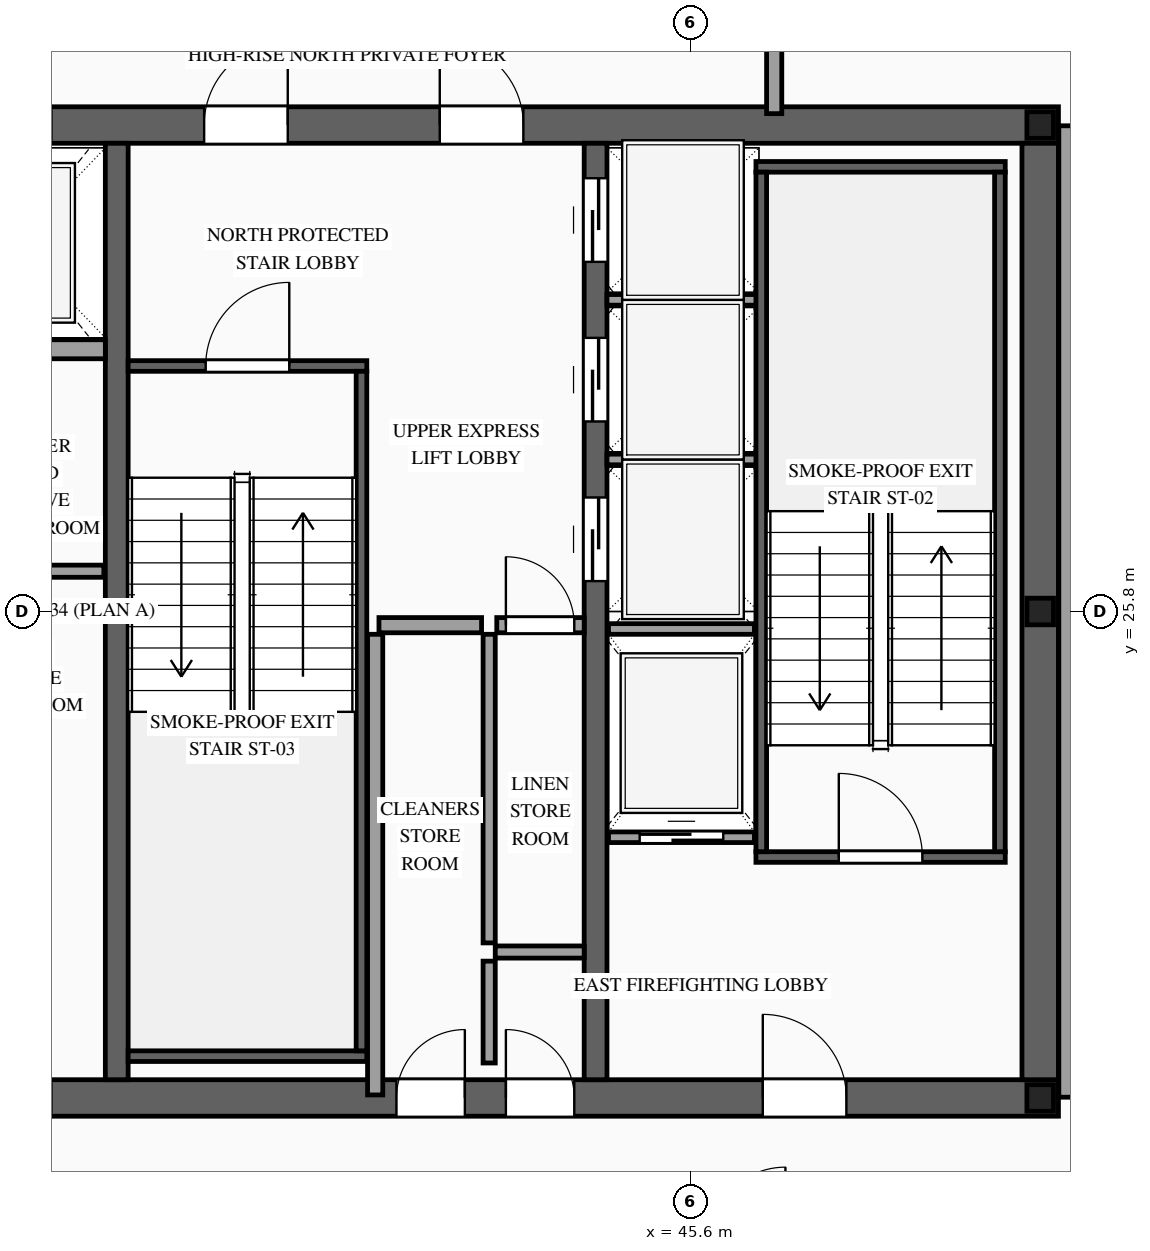
"""IFC4 building model, lengths in metres.
Left out: names, types, materials, properties, quantities, classifications, styles, units other than length and angle.
Written with IfcOpenShell. Run it as: python <this file> out.ifc"""

import sys

from ifc_helpers import new_model, si_unit, direction, frame, frame_2d, origin, origin_2d, place, context, subcontext, project, spatial, rectangle, i_section, extrude, source, transform, mapped, element, fill, save


model = new_model("IFC4")
c1 = context("Model", 3, precision=1e-05, world=origin(), true_north=direction((0.0, 1.0)))
c2 = subcontext(c1, "Body", "Model", "MODEL_VIEW")
j1 = project(units=[si_unit("LENGTHUNIT", "METRE"), si_unit("PLANEANGLEUNIT", "RADIAN")], contexts=[c1])
p1 = place(None, origin())
s1 = spatial("IfcSite", under=j1, at=p1, CompositionType="ELEMENT")
p2 = place(p1, origin())
s2 = spatial("IfcBuilding", under=s1, at=p2, CompositionType="ELEMENT")
p3 = place(p2, frame((0.0, 0.0, 343.2)))
s3 = spatial("IfcBuildingStorey", under=s2, at=p3, CompositionType="ELEMENT", Elevation=343.2)
p4 = place(p3, frame((23.56, 19.4, 0.0), z_axis=(0.0, 0.0, 1.0), x_axis=(1.0, 0.0, 0.0)))
e1 = element("IfcWall", 1, at=p4, inside=s3, PredefinedType="SHEAR", context=c2, shape_type="SweptSolid", body=[
    extrude(rectangle(XDim=26.88, YDim=0.48, at=frame_2d((13.44, 0.0))), origin(), (0.0, 0.0, 1.0), 4.0),
])
p5 = place(p4, frame((1.89, 0.0, 0.0)))
e2 = element("IfcOpeningElement", 2, at=p5, cuts=e1, PredefinedType="OPENING", context=c2, shape_type="SweptSolid", body=[
    extrude(rectangle(XDim=1.1, YDim=2.2, at=frame_2d((0.55, 1.1))), frame((0.0, 0.255, 0.0), z_axis=(0.0, -1.0, 0.0), x_axis=(1.0, 0.0, 0.0)), (0.0, 0.0, 1.0), 0.51),
])
p6 = place(p4, frame((9.79, 0.0, 0.0)))
e3 = element("IfcOpeningElement", 3, at=p6, cuts=e1, PredefinedType="OPENING", context=c2, shape_type="SweptSolid", body=[
    extrude(rectangle(XDim=1.1, YDim=2.2, at=frame_2d((0.55, 1.1))), frame((0.0, 0.255, 0.0), z_axis=(0.0, -1.0, 0.0), x_axis=(1.0, 0.0, 0.0)), (0.0, 0.0, 1.0), 0.51),
])
p7 = place(p4, frame((22.99, 0.0, 0.0)))
e4 = element("IfcOpeningElement", 4, at=p7, cuts=e1, PredefinedType="OPENING", context=c2, shape_type="SweptSolid", body=[
    extrude(rectangle(XDim=1.1, YDim=2.2, at=frame_2d((0.55, 1.1))), frame((0.0, 0.255, 0.0), z_axis=(0.0, -1.0, 0.0), x_axis=(1.0, 0.0, 0.0)), (0.0, 0.0, 1.0), 0.51),
])
p8 = place(p4, frame((19.61, 0.0, 0.0)))
e5 = element("IfcOpeningElement", 5, at=p8, cuts=e1, PredefinedType="OPENING", context=c2, shape_type="SweptSolid", body=[
    extrude(rectangle(XDim=0.9, YDim=2.15, at=frame_2d((0.45, 1.075))), frame((0.0, 0.255, 0.0), z_axis=(0.0, -1.0, 0.0), x_axis=(1.0, 0.0, 0.0)), (0.0, 0.0, 1.0), 0.51),
])
p9 = place(p4, frame((18.17, 0.0, 0.0)))
e6 = element("IfcOpeningElement", 6, at=p9, cuts=e1, PredefinedType="OPENING", context=c2, shape_type="SweptSolid", body=[
    extrude(rectangle(XDim=0.9, YDim=2.15, at=frame_2d((0.45, 1.075))), frame((0.0, 0.255, 0.0), z_axis=(0.0, -1.0, 0.0), x_axis=(1.0, 0.0, 0.0)), (0.0, 0.0, 1.0), 0.51),
])
p10 = place(p3, frame((23.56, 32.2, 0.0), z_axis=(0.0, 0.0, 1.0), x_axis=(1.0, 0.0, 0.0)))
e7 = element("IfcWall", 7, at=p10, inside=s3, PredefinedType="SHEAR", context=c2, shape_type="SweptSolid", body=[
    extrude(rectangle(XDim=26.88, YDim=0.48, at=frame_2d((13.44, 0.0))), origin(), (0.0, 0.0, 1.0), 4.0),
])
p11 = place(p10, frame((4.51, 0.0, 0.0)))
e8 = element("IfcOpeningElement", 8, at=p11, cuts=e7, PredefinedType="OPENING", context=c2, shape_type="SweptSolid", body=[
    extrude(rectangle(XDim=0.9, YDim=2.15, at=frame_2d((0.45, 1.075))), frame((0.0, 0.255, 0.0), z_axis=(0.0, -1.0, 0.0), x_axis=(1.0, 0.0, 0.0)), (0.0, 0.0, 1.0), 0.51),
])
p12 = place(p10, frame((9.79, 0.0, 0.0)))
e9 = element("IfcOpeningElement", 9, at=p12, cuts=e7, PredefinedType="OPENING", context=c2, shape_type="SweptSolid", body=[
    extrude(rectangle(XDim=1.1, YDim=2.2, at=frame_2d((0.55, 1.1))), frame((0.0, 0.255, 0.0), z_axis=(0.0, -1.0, 0.0), x_axis=(1.0, 0.0, 0.0)), (0.0, 0.0, 1.0), 0.51),
])
p13 = place(p10, frame((15.64, 0.0, 0.0)))
e10 = element("IfcOpeningElement", 10, at=p13, cuts=e7, PredefinedType="OPENING", context=c2, shape_type="SweptSolid", body=[
    extrude(rectangle(XDim=1.1, YDim=2.2, at=frame_2d((0.55, 1.1))), frame((0.0, 0.255, 0.0), z_axis=(0.0, -1.0, 0.0), x_axis=(1.0, 0.0, 0.0)), (0.0, 0.0, 1.0), 0.51),
])
p14 = place(p10, frame((18.74, 0.0, 0.0)))
e11 = element("IfcOpeningElement", 11, at=p14, cuts=e7, PredefinedType="OPENING", context=c2, shape_type="SweptSolid", body=[
    extrude(rectangle(XDim=1.1, YDim=2.2, at=frame_2d((0.55, 1.1))), frame((0.0, 0.255, 0.0), z_axis=(0.0, -1.0, 0.0), x_axis=(1.0, 0.0, 0.0)), (0.0, 0.0, 1.0), 0.51),
])
m1 = source(origin(), c2, "Body", "SweptSolid", [
    extrude(rectangle(XDim=12.32, YDim=0.48, at=frame_2d((6.16, 0.0))), origin(), (0.0, 0.0, 1.0), 4.0),
])
p15 = place(p3, frame((50.2, 19.64, 0.0), z_axis=(0.0, 0.0, 1.0), x_axis=(0.0, 1.0, 0.0)))
e12 = element("IfcWall", 12, at=p15, inside=s3, PredefinedType="SHEAR", context=c2, shape_type="MappedRepresentation", body=[
    mapped(m1, transform((0.0, 0.0, 0.0), scale=1.0)),
])
m2 = source(origin(), c2, "Body", "SweptSolid", [
    extrude(rectangle(XDim=12.32, YDim=0.3, at=frame_2d((6.16, 0.0))), origin(), (0.0, 0.0, 1.0), 4.0),
])
p16 = place(p3, frame((38.05, 19.64, 0.0), z_axis=(0.0, 0.0, 1.0), x_axis=(0.0, 1.0, 0.0)))
e13 = element("IfcWall", 13, at=p16, inside=s3, PredefinedType="SOLIDWALL", context=c2, shape_type="MappedRepresentation", body=[
    mapped(m2, transform((0.0, 0.0, 0.0), scale=1.0)),
])
p17 = place(p3, frame((44.35, 19.64, 0.0), z_axis=(0.0, 0.0, 1.0), x_axis=(0.0, 1.0, 0.0)))
e14 = element("IfcWall", 14, at=p17, inside=s3, PredefinedType="SOLIDWALL", context=c2, shape_type="SweptSolid", body=[
    extrude(rectangle(XDim=12.32, YDim=0.3, at=frame_2d((6.16, 0.0))), origin(), (0.0, 0.0, 1.0), 4.0),
])
p18 = place(p17, frame((6.56, 0.0, 0.0)))
e15 = element("IfcOpeningElement", 15, at=p18, cuts=e14, PredefinedType="OPENING", context=c2, shape_type="SweptSolid", body=[
    extrude(rectangle(XDim=1.1, YDim=2.2, at=frame_2d((0.55, 1.1))), frame((0.0, 0.165, 0.0), z_axis=(0.0, -1.0, 0.0), x_axis=(1.0, 0.0, 0.0)), (0.0, 0.0, 1.0), 0.33),
])
p19 = place(p17, frame((8.66, 0.0, 0.0)))
e16 = element("IfcOpeningElement", 16, at=p19, cuts=e14, PredefinedType="OPENING", context=c2, shape_type="SweptSolid", body=[
    extrude(rectangle(XDim=1.1, YDim=2.2, at=frame_2d((0.55, 1.1))), frame((0.0, 0.165, 0.0), z_axis=(0.0, -1.0, 0.0), x_axis=(1.0, 0.0, 0.0)), (0.0, 0.0, 1.0), 0.33),
])
p20 = place(p17, frame((10.76, 0.0, 0.0)))
e17 = element("IfcOpeningElement", 17, at=p20, cuts=e14, PredefinedType="OPENING", context=c2, shape_type="SweptSolid", body=[
    extrude(rectangle(XDim=1.1, YDim=2.2, at=frame_2d((0.55, 1.1))), frame((0.0, 0.165, 0.0), z_axis=(0.0, -1.0, 0.0), x_axis=(1.0, 0.0, 0.0)), (0.0, 0.0, 1.0), 0.33),
])
m3 = source(origin(), c2, "Body", "SweptSolid", [
    extrude(i_section(OverallWidth=0.35, OverallDepth=0.35, WebThickness=0.012, FlangeThickness=0.019, at=origin_2d()), origin(), (0.0, 0.0, 1.0), 4.0),
])
for number, where, z_axis, x_axis in (
    (18, (50.2, 19.4, 0.0), (0.0, 0.0, 1.0), (1.0, 0.0, 0.0)),
    (19, (50.2, 25.8, 0.0), (0.0, 0.0, 1.0), (1.0, 0.0, 0.0)),
    (20, (50.2, 32.2, 0.0), (0.0, 0.0, 1.0), (1.0, 0.0, 0.0)),
):
    element("IfcColumn", number, at=place(p3, frame(where, z_axis=z_axis, x_axis=x_axis)), inside=s3, PredefinedType="COLUMN", context=c2, shape_type="MappedRepresentation", body=[
        mapped(m3, transform((0.0, 0.0, 0.0), scale=1.0)),
    ])
p21 = place(p3, frame((44.52, 22.83, 0.0), z_axis=(0.0, 0.0, 1.0), x_axis=(1.0, 0.0, 0.0)))
e21 = element("IfcWall", 21, at=p21, inside=s3, PredefinedType="SOLIDWALL", context=c2, shape_type="SweptSolid", body=[
    extrude(rectangle(XDim=1.92, YDim=0.14, at=frame_2d((0.96, 0.0))), origin(), (0.0, 0.0, 1.0), 3.76),
])
p22 = place(p21, frame((0.41, 0.0, 0.0)))
e22 = element("IfcOpeningElement", 22, at=p22, cuts=e21, PredefinedType="OPENING", context=c2, shape_type="SweptSolid", body=[
    extrude(rectangle(XDim=1.1, YDim=2.2, at=frame_2d((0.55, 1.1))), frame((0.0, 0.085, 0.0), z_axis=(0.0, -1.0, 0.0), x_axis=(1.0, 0.0, 0.0)), (0.0, 0.0, 1.0), 0.17),
])
m4 = source(origin(), c2, "Body", "SweptSolid", [
    extrude(rectangle(XDim=1.92, YDim=0.14, at=frame_2d((0.96, 0.0))), origin(), (0.0, 0.0, 1.0), 3.76),
])
p23 = place(p3, frame((44.52, 25.57, 0.0), z_axis=(0.0, 0.0, 1.0), x_axis=(1.0, 0.0, 0.0)))
e23 = element("IfcWall", 23, at=p23, inside=s3, PredefinedType="SOLIDWALL", context=c2, shape_type="MappedRepresentation", body=[
    mapped(m4, transform((0.0, 0.0, 0.0), scale=1.0)),
])
m5 = source(origin(), c2, "Body", "SweptSolid", [
    extrude(rectangle(XDim=2.4, YDim=0.25, at=frame_2d((1.2, 0.0))), origin(), (0.0, 0.0, 1.0), 3.76),
])
p24 = place(p3, frame((35.5, 29.25, 0.0), z_axis=(0.0, 0.0, 1.0), x_axis=(1.0, 0.0, 0.0)))
e24 = element("IfcWall", 24, at=p24, inside=s3, PredefinedType="SOLIDWALL", context=c2, shape_type="MappedRepresentation", body=[
    mapped(m5, transform((0.0, 0.0, 0.0), scale=1.0)),
])
m6 = source(origin(), c2, "Body", "SweptSolid", [
    extrude(rectangle(XDim=2.0, YDim=0.14, at=frame_2d((1.0, 0.0))), origin(), (0.0, 0.0, 1.0), 3.76),
])
for number, where, z_axis, x_axis in (
    (25, (44.5, 27.8, 0.0), (0.0, 0.0, 1.0), (1.0, 0.0, 0.0)),
    (26, (44.5, 29.9, 0.0), (0.0, 0.0, 1.0), (1.0, 0.0, 0.0)),
):
    element("IfcWall", number, at=place(p3, frame(where, z_axis=z_axis, x_axis=x_axis)), inside=s3, PredefinedType="SOLIDWALL", context=c2, shape_type="MappedRepresentation", body=[
        mapped(m6, transform((0.0, 0.0, 0.0), scale=1.0)),
    ])
p25 = place(p3, frame((46.46, 22.57, 0.0), z_axis=(0.0, 0.0, 1.0), x_axis=(1.0, 0.0, 0.0)))
e27 = element("IfcWall", 27, at=p25, inside=s3, PredefinedType="SOLIDWALL", context=c2, shape_type="SweptSolid", body=[
    extrude(rectangle(XDim=3.28, YDim=0.14, at=frame_2d((1.64, 0.0))), origin(), (0.0, 0.0, 1.0), 3.76),
])
p26 = place(p25, frame((1.09, 0.0, 0.0)))
e28 = element("IfcOpeningElement", 28, at=p26, cuts=e27, PredefinedType="OPENING", context=c2, shape_type="SweptSolid", body=[
    extrude(rectangle(XDim=1.1, YDim=2.2, at=frame_2d((0.55, 1.1))), frame((0.0, 0.085, 0.0), z_axis=(0.0, -1.0, 0.0), x_axis=(1.0, 0.0, 0.0)), (0.0, 0.0, 1.0), 0.17),
])
m7 = source(origin(), c2, "Body", "SweptSolid", [
    extrude(rectangle(XDim=3.28, YDim=0.14, at=frame_2d((1.64, 0.0))), origin(), (0.0, 0.0, 1.0), 3.76),
])
p27 = place(p3, frame((46.46, 31.65, 0.0), z_axis=(0.0, 0.0, 1.0), x_axis=(1.0, 0.0, 0.0)))
e29 = element("IfcWall", 29, at=p27, inside=s3, PredefinedType="SOLIDWALL", context=c2, shape_type="MappedRepresentation", body=[
    mapped(m7, transform((0.0, 0.0, 0.0), scale=1.0)),
])
m8 = source(origin(), c2, "Body", "SweptSolid", [
    extrude(rectangle(XDim=8.94, YDim=0.14, at=frame_2d((4.47, 0.0))), origin(), (0.0, 0.0, 1.0), 3.76),
])
for number, where, z_axis, x_axis in (
    (30, (46.53, 22.64, 0.0), (0.0, 0.0, 1.0), (0.0, 1.0, 0.0)),
    (31, (49.67, 22.64, 0.0), (0.0, 0.0, 1.0), (0.0, 1.0, 0.0)),
):
    element("IfcWall", number, at=place(p3, frame(where, z_axis=z_axis, x_axis=x_axis)), inside=s3, PredefinedType="SOLIDWALL", context=c2, shape_type="MappedRepresentation", body=[
        mapped(m8, transform((0.0, 0.0, 0.0), scale=1.0)),
    ])
p28 = place(p3, frame((38.2, 29.03, 0.0), z_axis=(0.0, 0.0, 1.0), x_axis=(1.0, 0.0, 0.0)))
e32 = element("IfcWall", 32, at=p28, inside=s3, PredefinedType="SOLIDWALL", context=c2, shape_type="SweptSolid", body=[
    extrude(rectangle(XDim=3.14, YDim=0.14, at=frame_2d((1.57, 0.0))), origin(), (0.0, 0.0, 1.0), 3.76),
])
p29 = place(p28, frame((1.02, 0.0, 0.0)))
e33 = element("IfcOpeningElement", 33, at=p29, cuts=e32, PredefinedType="OPENING", context=c2, shape_type="SweptSolid", body=[
    extrude(rectangle(XDim=1.1, YDim=2.2, at=frame_2d((0.55, 1.1))), frame((0.0, 0.085, 0.0), z_axis=(0.0, -1.0, 0.0), x_axis=(1.0, 0.0, 0.0)), (0.0, 0.0, 1.0), 0.17),
])
m9 = source(origin(), c2, "Body", "SweptSolid", [
    extrude(rectangle(XDim=3.14, YDim=0.14, at=frame_2d((1.57, 0.0))), origin(), (0.0, 0.0, 1.0), 3.76),
])
p30 = place(p3, frame((38.2, 19.95, 0.0), z_axis=(0.0, 0.0, 1.0), x_axis=(1.0, 0.0, 0.0)))
e34 = element("IfcWall", 34, at=p30, inside=s3, PredefinedType="SOLIDWALL", context=c2, shape_type="MappedRepresentation", body=[
    mapped(m9, transform((0.0, 0.0, 0.0), scale=1.0)),
])
m10 = source(origin(), c2, "Body", "SweptSolid", [
    extrude(rectangle(XDim=8.94, YDim=0.14, at=frame_2d((4.47, 0.0))), origin(), (0.0, 0.0, 1.0), 3.76),
])
p31 = place(p3, frame((41.27, 20.02, 0.0), z_axis=(0.0, 0.0, 1.0), x_axis=(0.0, 1.0, 0.0)))
e35 = element("IfcWall", 35, at=p31, inside=s3, PredefinedType="SOLIDWALL", context=c2, shape_type="MappedRepresentation", body=[
    mapped(m10, transform((0.0, 0.0, 0.0), scale=1.0)),
])
m11 = source(origin(), c2, "Body", "SweptSolid", [
    extrude(rectangle(XDim=2.36, YDim=0.16, at=frame_2d((1.18, 0.0))), origin(), (0.0, 0.0, 1.0), 3.76),
])
p32 = place(p3, frame((35.52, 26.33, 0.0), z_axis=(0.0, 0.0, 1.0), x_axis=(1.0, 0.0, 0.0)))
e36 = element("IfcWall", 36, at=p32, inside=s3, PredefinedType="PARTITIONING", context=c2, shape_type="MappedRepresentation", body=[
    mapped(m11, transform((0.0, 0.0, 0.0), scale=1.0)),
])
m12 = source(origin(), c2, "Body", "SweptSolid", [
    extrude(rectangle(XDim=1.34, YDim=0.16, at=frame_2d((0.67, 0.0))), origin(), (0.0, 0.0, 1.0), 3.76),
])
p33 = place(p3, frame((42.95, 19.86, 0.0), z_axis=(0.0, 0.0, 1.0), x_axis=(0.0, 1.0, 0.0)))
e37 = element("IfcWall", 37, at=p33, inside=s3, PredefinedType="PARTITIONING", context=c2, shape_type="MappedRepresentation", body=[
    mapped(m12, transform((0.0, 0.0, 0.0), scale=1.0)),
])
m13 = source(origin(), c2, "Body", "SweptSolid", [
    extrude(rectangle(XDim=1.17, YDim=0.16, at=frame_2d((0.585, 0.0))), origin(), (0.0, 0.0, 1.0), 3.76),
])
p34 = place(p3, frame((43.03, 21.32, 0.0), z_axis=(0.0, 0.0, 1.0), x_axis=(1.0, 0.0, 0.0)))
e38 = element("IfcWall", 38, at=p34, inside=s3, PredefinedType="PARTITIONING", context=c2, shape_type="MappedRepresentation", body=[
    mapped(m13, transform((0.0, 0.0, 0.0), scale=1.0)),
])
m14 = source(origin(), c2, "Body", "SweptSolid", [
    extrude(rectangle(XDim=6.06, YDim=0.2, at=frame_2d((3.03, 0.0))), origin(), (0.0, 0.0, 1.0), 3.76),
])
p35 = place(p3, frame((41.45, 19.44, 0.0), z_axis=(0.0, 0.0, 1.0), x_axis=(0.0, 1.0, 0.0)))
e39 = element("IfcWall", 39, at=p35, inside=s3, PredefinedType="PARTITIONING", context=c2, shape_type="MappedRepresentation", body=[
    mapped(m14, transform((0.0, 0.0, 0.0), scale=1.0)),
])
m15 = source(origin(), c2, "Body", "SweptSolid", [
    extrude(rectangle(XDim=1.35, YDim=0.2, at=frame_2d((0.675, 0.0))), origin(), (0.0, 0.0, 1.0), 3.76),
])
p36 = place(p3, frame((41.5, 25.62, 0.0), z_axis=(0.0, 0.0, 1.0), x_axis=(1.0, 0.0, 0.0)))
e40 = element("IfcWall", 40, at=p36, inside=s3, PredefinedType="PARTITIONING", context=c2, shape_type="MappedRepresentation", body=[
    mapped(m15, transform((0.0, 0.0, 0.0), scale=1.0)),
])
m16 = source(origin(), c2, "Body", "SweptSolid", [
    extrude(rectangle(XDim=4.06, YDim=0.16, at=frame_2d((2.03, 0.0))), origin(), (0.0, 0.0, 1.0), 3.76),
])
p37 = place(p3, frame((42.95, 21.44, 0.0), z_axis=(0.0, 0.0, 1.0), x_axis=(0.0, 1.0, 0.0)))
e41 = element("IfcWall", 41, at=p37, inside=s3, PredefinedType="PARTITIONING", context=c2, shape_type="MappedRepresentation", body=[
    mapped(m16, transform((0.0, 0.0, 0.0), scale=1.0)),
])
p38 = place(p3, frame((43.05, 25.62, 0.0), z_axis=(0.0, 0.0, 1.0), x_axis=(1.0, 0.0, 0.0)))
e42 = element("IfcWall", 42, at=p38, inside=s3, PredefinedType="PARTITIONING", context=c2, shape_type="SweptSolid", body=[
    extrude(rectangle(XDim=1.15, YDim=0.2, at=frame_2d((0.575, 0.0))), origin(), (0.0, 0.0, 1.0), 3.76),
])
p39 = place(p38, frame((0.12, 0.0, 0.0)))
e43 = element("IfcOpeningElement", 43, at=p39, cuts=e42, PredefinedType="OPENING", context=c2, shape_type="SweptSolid", body=[
    extrude(rectangle(XDim=0.9, YDim=2.15, at=frame_2d((0.45, 1.075))), frame((0.0, 0.115, 0.0), z_axis=(0.0, -1.0, 0.0), x_axis=(1.0, 0.0, 0.0)), (0.0, 0.0, 1.0), 0.23),
])
m17 = source(origin(), c2, "Body", "SweptSolid", [
    extrude(rectangle(XDim=1.7, YDim=0.2, at=frame_2d((0.85, 0.0))), origin(), (0.0, 0.0, 1.0), 3.76),
])
p40 = place(p3, frame((46.7, 32.35, 0.0), z_axis=(0.0, 0.0, 1.0), x_axis=(0.0, 1.0, 0.0)))
e44 = element("IfcWall", 44, at=p40, inside=s3, PredefinedType="PARTITIONING", context=c2, shape_type="MappedRepresentation", body=[
    mapped(m17, transform((0.0, 0.0, 0.0), scale=1.0)),
])
m18 = source(origin(), c2, "Body", "SweptSolid", [
    extrude(rectangle(XDim=12.78, YDim=0.2, at=frame_2d((6.39, 0.0))), origin(), (0.0, 0.0, 1.0), 3.76),
])
p41 = place(p3, frame((50.545, 19.41, 0.0), z_axis=(0.0, 0.0, 1.0), x_axis=(0.0, 1.0, 0.0)))
e45 = element("IfcWall", 45, at=p41, inside=s3, PredefinedType="PARTITIONING", context=c2, shape_type="MappedRepresentation", body=[
    mapped(m18, transform((0.0, 0.0, 0.0), scale=1.0)),
])
m19 = source(origin(), c2, "Body", "SweptSolid", [
    extrude(rectangle(XDim=1.1, YDim=2.2, at=frame_2d((0.55, 1.1))), frame((0.0, 0.025, 0.0), z_axis=(0.0, -1.0, 0.0), x_axis=(1.0, 0.0, 0.0)), (0.0, 0.0, 1.0), 0.05),
])
p42 = place(p22, origin())
e46 = element("IfcDoor", 46, at=p42, inside=s3, OperationType="SLIDING_TO_RIGHT", PredefinedType="DOOR", context=c2, shape_type="MappedRepresentation", body=[
    mapped(m19, transform((0.0, 0.0, 0.0), scale=1.0)),
])
fill(e22, e46)
p43 = place(p18, origin())
e47 = element("IfcDoor", 47, at=p43, inside=s3, OperationType="SLIDING_TO_LEFT", PredefinedType="DOOR", context=c2, shape_type="MappedRepresentation", body=[
    mapped(m19, transform((0.0, 0.0, 0.0), scale=1.0)),
])
fill(e15, e47)
p44 = place(p19, origin())
e48 = element("IfcDoor", 48, at=p44, inside=s3, OperationType="SLIDING_TO_RIGHT", PredefinedType="DOOR", context=c2, shape_type="MappedRepresentation", body=[
    mapped(m19, transform((0.0, 0.0, 0.0), scale=1.0)),
])
fill(e16, e48)
p45 = place(p20, origin())
e49 = element("IfcDoor", 49, at=p45, inside=s3, OperationType="SLIDING_TO_LEFT", PredefinedType="DOOR", context=c2, shape_type="MappedRepresentation", body=[
    mapped(m19, transform((0.0, 0.0, 0.0), scale=1.0)),
])
fill(e17, e49)
m20 = source(origin(), c2, "Body", "SweptSolid", [
    extrude(rectangle(XDim=1.1, YDim=2.2, at=frame_2d((0.55, 1.1))), frame((0.0, 0.025, 0.0), z_axis=(0.0, -1.0, 0.0), x_axis=(1.0, 0.0, 0.0)), (0.0, 0.0, 1.0), 0.05),
])
p46 = place(p26, origin())
e50 = element("IfcDoor", 50, at=p46, inside=s3, OperationType="SINGLE_SWING_LEFT", PredefinedType="DOOR", context=c2, shape_type="MappedRepresentation", body=[
    mapped(m20, transform((0.0, 0.0, 0.0), scale=1.0)),
])
fill(e28, e50)
p47 = place(p29, origin())
e51 = element("IfcDoor", 51, at=p47, inside=s3, OperationType="SINGLE_SWING_RIGHT", PredefinedType="DOOR", context=c2, shape_type="MappedRepresentation", body=[
    mapped(m20, transform((0.0, 0.0, 0.0), scale=1.0)),
])
fill(e33, e51)
p48 = place(p7, origin())
e52 = element("IfcDoor", 52, at=p48, inside=s3, OperationType="SINGLE_SWING_LEFT", PredefinedType="DOOR", context=c2, shape_type="MappedRepresentation", body=[
    mapped(m20, transform((0.0, 0.0, 0.0), scale=1.0)),
])
fill(e4, e52)
p49 = place(p13, origin())
e53 = element("IfcDoor", 53, at=p49, inside=s3, OperationType="SINGLE_SWING_RIGHT", PredefinedType="DOOR", context=c2, shape_type="MappedRepresentation", body=[
    mapped(m20, transform((0.0, 0.0, 0.0), scale=1.0)),
])
fill(e10, e53)
p50 = place(p14, origin())
e54 = element("IfcDoor", 54, at=p50, inside=s3, OperationType="SINGLE_SWING_LEFT", PredefinedType="DOOR", context=c2, shape_type="MappedRepresentation", body=[
    mapped(m20, transform((0.0, 0.0, 0.0), scale=1.0)),
])
fill(e11, e54)
m21 = source(origin(), c2, "Body", "SweptSolid", [
    extrude(rectangle(XDim=0.9, YDim=2.15, at=frame_2d((0.45, 1.075))), frame((0.0, 0.025, 0.0), z_axis=(0.0, -1.0, 0.0), x_axis=(1.0, 0.0, 0.0)), (0.0, 0.0, 1.0), 0.05),
])
p51 = place(p8, origin())
e55 = element("IfcDoor", 55, at=p51, inside=s3, OperationType="SINGLE_SWING_LEFT", PredefinedType="DOOR", context=c2, shape_type="MappedRepresentation", body=[
    mapped(m21, transform((0.0, 0.0, 0.0), scale=1.0)),
])
fill(e5, e55)
p52 = place(p9, origin())
e56 = element("IfcDoor", 56, at=p52, inside=s3, OperationType="SINGLE_SWING_RIGHT", PredefinedType="DOOR", context=c2, shape_type="MappedRepresentation", body=[
    mapped(m21, transform((0.0, 0.0, 0.0), scale=1.0)),
])
fill(e6, e56)
p53 = place(p39, origin())
e57 = element("IfcDoor", 57, at=p53, inside=s3, OperationType="SINGLE_SWING_LEFT", PredefinedType="DOOR", context=c2, shape_type="MappedRepresentation", body=[
    mapped(m21, transform((0.0, 0.0, 0.0), scale=1.0)),
])
fill(e43, e57)
save(model, sys.argv[1])
